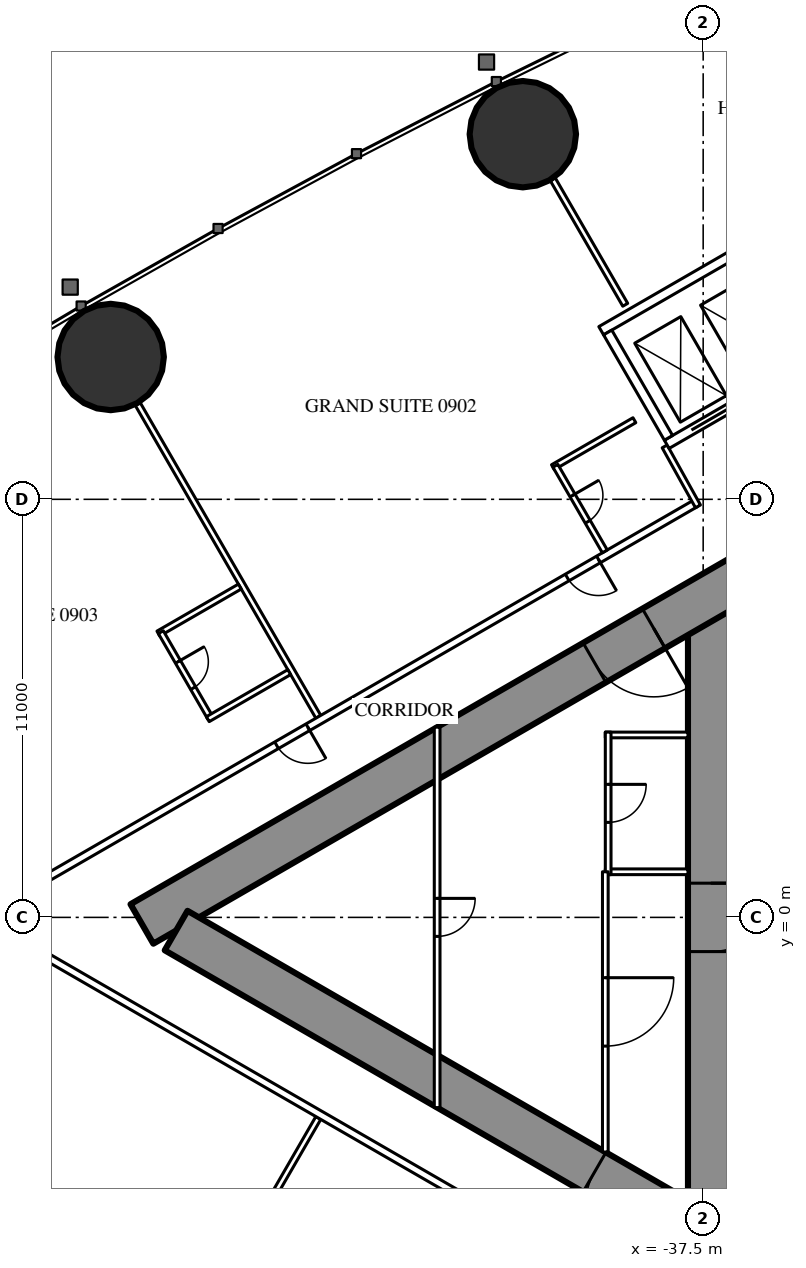
"""IFC4 building model, lengths in metres.
Left out: names, types, materials, properties, quantities, classifications, styles, units other than length and angle.
Written with IfcOpenShell. Run it as: python <this file> out.ifc"""

import sys

from ifc_helpers import new_model, si_unit, direction, frame, frame_2d, origin, origin_2d, place, context, subcontext, project, spatial, rectangle, hollow_circle, extrude, element, fill, save


model = new_model("IFC4")
c1 = context("Model", 3, precision=1e-05, world=origin(), true_north=direction((0.0, 1.0)))
c2 = subcontext(c1, "Body", "Model", "MODEL_VIEW")
j1 = project(units=[si_unit("LENGTHUNIT", "METRE"), si_unit("PLANEANGLEUNIT", "RADIAN")], contexts=[c1])
p1 = place(None, origin())
s1 = spatial("IfcSite", under=j1, at=p1, CompositionType="ELEMENT")
p2 = place(p1, origin())
s2 = spatial("IfcBuilding", under=s1, at=p2, CompositionType="ELEMENT")
p3 = place(p2, frame((0.0, 0.0, 39.0)))
s3 = spatial("IfcBuildingStorey", under=s2, at=p3, CompositionType="ELEMENT", Elevation=39.0)
for number, where, z_axis, x_axis in (
    (1, (-42.245, 20.607, 0.0), (0.0, 0.0, 1.0), (1.0, 0.0, 0.0)),
    (2, (-53.09, 14.745, 0.0), (0.0, 0.0, 1.0), (1.0, 0.0, 0.0)),
):
    element("IfcColumn", number, at=place(p3, frame(where, z_axis=z_axis, x_axis=x_axis)), inside=s3, PredefinedType="COLUMN", context=c2, shape_type="SweptSolid", body=[
        extrude(hollow_circle(Radius=1.4, WallThickness=0.12, at=origin_2d()), origin(), (0.0, 0.0, 1.0), 3.5),
    ])
p4 = place(p3, frame((-37.3, 8.6, 0.0), z_axis=(0.0, 0.0, 1.0), x_axis=(0.0, -1.0, 0.0)))
e3 = element("IfcWall", 3, at=p4, inside=s3, PredefinedType="SHEAR", context=c2, shape_type="SweptSolid", body=[
    extrude(rectangle(XDim=17.2, YDim=1.2, at=frame_2d((8.6, 0.0))), origin(), (0.0, 0.0, 1.0), 3.5),
])
p5 = place(p4, frame((7.7, 0.0, 0.0)))
e4 = element("IfcOpeningElement", 4, at=p5, cuts=e3, PredefinedType="OPENING", context=c2, shape_type="SweptSolid", body=[
    extrude(rectangle(XDim=1.8, YDim=2.2, at=frame_2d((0.9, 1.1))), frame((0.0, 0.61, 0.0), z_axis=(0.0, -1.0, 0.0), x_axis=(1.0, 0.0, 0.0)), (0.0, 0.0, 1.0), 1.22),
])
p6 = place(p3, frame((-27.2, 14.3, 0.0), z_axis=(0.0, 0.0, 1.0), x_axis=(-0.866026593062, -0.499997940104, 0.0)))
e5 = element("IfcWall", 5, at=p6, inside=s3, PredefinedType="SHEAR", context=c2, shape_type="SweptSolid", body=[
    extrude(rectangle(XDim=28.946, YDim=1.2, at=frame_2d((14.473, 0.0))), origin(), (0.0, 0.0, 1.0), 3.5),
])
p7 = place(p6, frame((4.6, 0.0, 0.0)))
e6 = element("IfcOpeningElement", 6, at=p7, cuts=e5, PredefinedType="OPENING", context=c2, shape_type="SweptSolid", body=[
    extrude(rectangle(XDim=1.0, YDim=2.2, at=frame_2d((0.5, 1.1))), frame((0.0, 0.61, 0.0), z_axis=(0.0, -1.0, 0.0), x_axis=(1.0, 0.0, 0.0)), (0.0, 0.0, 1.0), 1.22),
])
p8 = place(p6, frame((13.395, 0.0, 0.0)))
e7 = element("IfcOpeningElement", 7, at=p8, cuts=e5, PredefinedType="OPENING", context=c2, shape_type="SweptSolid", body=[
    extrude(rectangle(XDim=1.8, YDim=2.2, at=frame_2d((0.9, 1.1))), frame((0.0, 0.61, 0.0), z_axis=(0.0, -1.0, 0.0), x_axis=(1.0, 0.0, 0.0)), (0.0, 0.0, 1.0), 1.22),
])
p9 = place(p3, frame((-27.2, -14.3, 0.0), z_axis=(0.0, 0.0, 1.0), x_axis=(-0.866024021859, 0.500002393557, 0.0)))
e8 = element("IfcWall", 8, at=p9, inside=s3, PredefinedType="SHEAR", context=c2, shape_type="SweptSolid", body=[
    extrude(rectangle(XDim=27.907, YDim=1.2, at=frame_2d((13.954, 0.0))), origin(), (0.0, 0.0, 1.0), 3.5),
])
p10 = place(p9, frame((4.6, 0.0, 0.0)))
e9 = element("IfcOpeningElement", 9, at=p10, cuts=e8, PredefinedType="OPENING", context=c2, shape_type="SweptSolid", body=[
    extrude(rectangle(XDim=1.0, YDim=2.2, at=frame_2d((0.5, 1.1))), frame((0.0, 0.61, 0.0), z_axis=(0.0, -1.0, 0.0), x_axis=(1.0, 0.0, 0.0)), (0.0, 0.0, 1.0), 1.22),
])
p11 = place(p9, frame((13.395, 0.0, 0.0)))
e10 = element("IfcOpeningElement", 10, at=p11, cuts=e8, PredefinedType="OPENING", context=c2, shape_type="SweptSolid", body=[
    extrude(rectangle(XDim=1.8, YDim=2.2, at=frame_2d((0.9, 1.1))), frame((0.0, 0.61, 0.0), z_axis=(0.0, -1.0, 0.0), x_axis=(1.0, 0.0, 0.0)), (0.0, 0.0, 1.0), 1.22),
])
for number, where, z_axis, x_axis in (
    (11, (-47.627, 5.278, 0.0), (0.0, 0.0, 1.0), (-0.5, 0.866, 0.0)),
    (12, (-47.627, -5.278, 0.0), (0.0, 0.0, 1.0), (-0.5, -0.866, 0.0)),
):
    element("IfcWall", number, at=place(p3, frame(where, z_axis=z_axis, x_axis=x_axis)), inside=s3, PredefinedType="PARTITIONING", context=c2, shape_type="SweptSolid", body=[
        extrude(rectangle(XDim=9.51, YDim=0.15, at=frame_2d((4.755, 0.0))), origin(), (0.0, 0.0, 1.0), 2.25),
    ])
p12 = place(p3, frame((-39.551, 16.119, 0.0), z_axis=(0.0, 0.0, 1.0), x_axis=(-0.500014214979, 0.866017196607, 0.0)))
e13 = element("IfcWall", 13, at=p12, inside=s3, PredefinedType="PARTITIONING", context=c2, shape_type="SweptSolid", body=[
    extrude(rectangle(XDim=3.815, YDim=0.15, at=frame_2d((1.907, 0.0))), origin(), (0.0, 0.0, 1.0), 3.25),
])
p13 = place(p3, frame((-37.7, 10.894, 0.0), z_axis=(0.0, 0.0, 1.0), x_axis=(-0.866027905338, -0.499995667157, 0.0)))
e14 = element("IfcWall", 14, at=p13, inside=s3, PredefinedType="PARTITIONING", context=c2, shape_type="SweptSolid", body=[
    extrude(rectangle(XDim=21.787, YDim=0.2, at=frame_2d((10.894, 0.0))), origin(), (0.0, 0.0, 1.0), 3.25),
])
p14 = place(p13, frame((11.78, 0.0, 0.0)))
e15 = element("IfcOpeningElement", 15, at=p14, cuts=e14, PredefinedType="OPENING", context=c2, shape_type="SweptSolid", body=[
    extrude(rectangle(XDim=0.95, YDim=2.2, at=frame_2d((0.475, 1.1))), frame((0.0, 0.11, 0.0), z_axis=(0.0, -1.0, 0.0), x_axis=(1.0, 0.0, 0.0)), (0.0, 0.0, 1.0), 0.22),
])
p15 = place(p13, frame((2.95, 0.0, 0.0)))
e16 = element("IfcOpeningElement", 16, at=p15, cuts=e14, PredefinedType="OPENING", context=c2, shape_type="SweptSolid", body=[
    extrude(rectangle(XDim=0.95, YDim=2.2, at=frame_2d((0.475, 1.1))), frame((0.0, 0.11, 0.0), z_axis=(0.0, -1.0, 0.0), x_axis=(1.0, 0.0, 0.0)), (0.0, 0.0, 1.0), 0.22),
])
p16 = place(p3, frame((-36.92, -11.344, 0.0), z_axis=(0.0, 0.0, 1.0), x_axis=(-0.866028313256, 0.499994960614, 0.0)))
e17 = element("IfcWall", 17, at=p16, inside=s3, PredefinedType="PARTITIONING", context=c2, shape_type="SweptSolid", body=[
    extrude(rectangle(XDim=22.568, YDim=0.2, at=frame_2d((11.284, 0.0))), origin(), (0.0, 0.0, 1.0), 3.25),
])
p17 = place(p16, frame((21.018, 0.0, 0.0)))
e18 = element("IfcOpeningElement", 18, at=p17, cuts=e17, PredefinedType="OPENING", context=c2, shape_type="SweptSolid", body=[
    extrude(rectangle(XDim=0.95, YDim=2.2, at=frame_2d((0.475, 1.1))), frame((0.0, 0.11, 0.0), z_axis=(0.0, -1.0, 0.0), x_axis=(1.0, 0.0, 0.0)), (0.0, 0.0, 1.0), 0.22),
])
p18 = place(p16, frame((3.35, 0.0, 0.0)))
e19 = element("IfcOpeningElement", 19, at=p18, cuts=e17, PredefinedType="OPENING", context=c2, shape_type="SweptSolid", body=[
    extrude(rectangle(XDim=1.0, YDim=2.2, at=frame_2d((0.5, 1.1))), frame((0.0, 0.11, 0.0), z_axis=(0.0, -1.0, 0.0), x_axis=(1.0, 0.0, 0.0)), (0.0, 0.0, 1.0), 0.22),
])
p19 = place(p3, frame((-38.513, 12.392, 0.0), z_axis=(0.0, 0.0, 1.0), x_axis=(0.485585508183, -0.874189175317, 0.0)))
e20 = element("IfcWall", 20, at=p19, inside=s3, PredefinedType="PARTITIONING", context=c2, shape_type="SweptSolid", body=[
    extrude(rectangle(XDim=1.805, YDim=0.15, at=frame_2d((0.902, 0.0))), origin(), (0.0, 0.0, 1.0), 3.25),
])
p20 = place(p3, frame((-49.692, 8.704, 0.0), z_axis=(0.0, 0.0, 1.0), x_axis=(-0.866073894602, -0.499916002032, 0.0)))
e21 = element("IfcWall", 21, at=p20, inside=s3, PredefinedType="PARTITIONING", context=c2, shape_type="SweptSolid", body=[
    extrude(rectangle(XDim=2.475, YDim=0.15, at=frame_2d((1.238, 0.0))), origin(), (0.0, 0.0, 1.0), 3.25),
])
p21 = place(p3, frame((-50.47, 5.253, 0.0), z_axis=(0.0, 0.0, 1.0), x_axis=(-0.500006934395, 0.866021400173, 0.0)))
e22 = element("IfcWall", 22, at=p21, inside=s3, PredefinedType="PARTITIONING", context=c2, shape_type="SweptSolid", body=[
    extrude(rectangle(XDim=2.6, YDim=0.15, at=frame_2d((1.3, 0.0))), origin(), (0.0, 0.0, 1.0), 3.25),
])
p22 = place(p21, frame((0.9, 0.0, 0.0)))
e23 = element("IfcOpeningElement", 23, at=p22, cuts=e22, PredefinedType="OPENING", context=c2, shape_type="SweptSolid", body=[
    extrude(rectangle(XDim=0.8, YDim=2.2, at=frame_2d((0.4, 1.1))), frame((0.0, 0.085, 0.0), z_axis=(0.0, -1.0, 0.0), x_axis=(1.0, 0.0, 0.0)), (0.0, 0.0, 1.0), 0.17),
])
p23 = place(p3, frame((-48.392, 6.453, 0.0), z_axis=(0.0, 0.0, 1.0), x_axis=(-0.86604923931, -0.499958713387, 0.0)))
e24 = element("IfcWall", 24, at=p23, inside=s3, PredefinedType="PARTITIONING", context=c2, shape_type="SweptSolid", body=[
    extrude(rectangle(XDim=2.475, YDim=0.15, at=frame_2d((1.237, 0.0))), origin(), (0.0, 0.0, 1.0), 3.25),
])
p24 = place(p3, frame((-39.31, 13.082, 0.0), z_axis=(0.0, 0.0, 1.0), x_axis=(-0.866031185235, -0.4999899861, 0.0)))
e25 = element("IfcWall", 25, at=p24, inside=s3, PredefinedType="PARTITIONING", context=c2, shape_type="SweptSolid", body=[
    extrude(rectangle(XDim=2.475, YDim=0.15, at=frame_2d((1.238, 0.0))), origin(), (0.0, 0.0, 1.0), 3.25),
])
p25 = place(p3, frame((-40.088, 9.63, 0.0), z_axis=(0.0, 0.0, 1.0), x_axis=(-0.500006934395, 0.866021400173, 0.0)))
e26 = element("IfcWall", 26, at=p25, inside=s3, PredefinedType="PARTITIONING", context=c2, shape_type="SweptSolid", body=[
    extrude(rectangle(XDim=2.6, YDim=0.15, at=frame_2d((1.3, 0.0))), origin(), (0.0, 0.0, 1.0), 3.25),
])
p26 = place(p25, frame((0.9, 0.0, 0.0)))
e27 = element("IfcOpeningElement", 27, at=p26, cuts=e26, PredefinedType="OPENING", context=c2, shape_type="SweptSolid", body=[
    extrude(rectangle(XDim=0.8, YDim=2.2, at=frame_2d((0.4, 1.1))), frame((0.0, 0.085, 0.0), z_axis=(0.0, -1.0, 0.0), x_axis=(1.0, 0.0, 0.0)), (0.0, 0.0, 1.0), 0.17),
])
for number, where, z_axis, x_axis in (
    (28, (-37.9, 1.2, 0.0), (0.0, 0.0, 1.0), (-1.0, 0.0, 0.0)),
    (29, (-37.9, 4.8, 0.0), (0.0, 0.0, 1.0), (-1.0, 0.0, 0.0)),
):
    element("IfcWall", number, at=place(p3, frame(where, z_axis=z_axis, x_axis=x_axis)), inside=s3, PredefinedType="PARTITIONING", context=c2, shape_type="SweptSolid", body=[
        extrude(rectangle(XDim=2.175, YDim=0.15, at=frame_2d((1.087, 0.0))), origin(), (0.0, 0.0, 1.0), 3.25),
    ])
p27 = place(p3, frame((-40.0, 4.875, 0.0), z_axis=(0.0, 0.0, 1.0), x_axis=(0.0, -1.0, 0.0)))
e30 = element("IfcWall", 30, at=p27, inside=s3, PredefinedType="PARTITIONING", context=c2, shape_type="SweptSolid", body=[
    extrude(rectangle(XDim=3.75, YDim=0.15, at=frame_2d((1.875, 0.0))), origin(), (0.0, 0.0, 1.0), 3.25),
])
p28 = place(p27, frame((1.375, 0.0, 0.0)))
e31 = element("IfcOpeningElement", 31, at=p28, cuts=e30, PredefinedType="OPENING", context=c2, shape_type="SweptSolid", body=[
    extrude(rectangle(XDim=1.0, YDim=2.2, at=frame_2d((0.5, 1.1))), frame((0.0, 0.085, 0.0), z_axis=(0.0, -1.0, 0.0), x_axis=(1.0, 0.0, 0.0)), (0.0, 0.0, 1.0), 0.17),
])
p29 = place(p3, frame((-40.075, 1.2, 0.0), z_axis=(0.0, 0.0, 1.0), x_axis=(0.0, -1.0, 0.0)))
e32 = element("IfcWall", 32, at=p29, inside=s3, PredefinedType="PARTITIONING", context=c2, shape_type="SweptSolid", body=[
    extrude(rectangle(XDim=7.374, YDim=0.15, at=frame_2d((3.687, 0.0))), origin(), (0.0, 0.0, 1.0), 3.25),
])
p30 = place(p29, frame((2.787, 0.0, 0.0)))
e33 = element("IfcOpeningElement", 33, at=p30, cuts=e32, PredefinedType="OPENING", context=c2, shape_type="SweptSolid", body=[
    extrude(rectangle(XDim=1.8, YDim=2.2, at=frame_2d((0.9, 1.1))), frame((0.0, 0.085, 0.0), z_axis=(0.0, -1.0, 0.0), x_axis=(1.0, 0.0, 0.0)), (0.0, 0.0, 1.0), 0.17),
])
p31 = place(p3, frame((-44.5, 5.005, 0.0), z_axis=(0.0, 0.0, 1.0), x_axis=(0.0, -1.0, 0.0)))
e34 = element("IfcWall", 34, at=p31, inside=s3, PredefinedType="PARTITIONING", context=c2, shape_type="SweptSolid", body=[
    extrude(rectangle(XDim=10.009, YDim=0.15, at=frame_2d((5.005, 0.0))), origin(), (0.0, 0.0, 1.0), 2.45),
])
p32 = place(p31, frame((4.505, 0.0, 0.0)))
e35 = element("IfcOpeningElement", 35, at=p32, cuts=e34, PredefinedType="OPENING", context=c2, shape_type="SweptSolid", body=[
    extrude(rectangle(XDim=1.0, YDim=2.2, at=frame_2d((0.5, 1.1))), frame((0.0, 0.085, 0.0), z_axis=(0.0, -1.0, 0.0), x_axis=(1.0, 0.0, 0.0)), (0.0, 0.0, 1.0), 0.17),
])
p33 = place(p3, frame((-31.01, 16.747, 0.0), z_axis=(0.0, 0.0, 1.0), x_axis=(-0.866028165386, -0.499995216735, 0.0)))
e36 = element("IfcWall", 36, at=p33, inside=s3, PredefinedType="PARTITIONING", context=c2, shape_type="SweptSolid", body=[
    extrude(rectangle(XDim=8.6, YDim=0.25, at=frame_2d((4.3, 0.0))), origin(), (0.0, 0.0, 1.0), 3.25),
])
p34 = place(p33, frame((0.75, 0.0, 0.0)))
e37 = element("IfcOpeningElement", 37, at=p34, cuts=e36, PredefinedType="OPENING", context=c2, shape_type="SweptSolid", body=[
    extrude(rectangle(XDim=1.1, YDim=2.2, at=frame_2d((0.55, 1.1))), frame((0.0, 0.135, 0.0), z_axis=(0.0, -1.0, 0.0), x_axis=(1.0, 0.0, 0.0)), (0.0, 0.0, 1.0), 0.27),
])
p35 = place(p33, frame((2.75, 0.0, 0.0)))
e38 = element("IfcOpeningElement", 38, at=p35, cuts=e36, PredefinedType="OPENING", context=c2, shape_type="SweptSolid", body=[
    extrude(rectangle(XDim=1.1, YDim=2.2, at=frame_2d((0.55, 1.1))), frame((0.0, 0.135, 0.0), z_axis=(0.0, -1.0, 0.0), x_axis=(1.0, 0.0, 0.0)), (0.0, 0.0, 1.0), 0.27),
])
p36 = place(p33, frame((4.75, 0.0, 0.0)))
e39 = element("IfcOpeningElement", 39, at=p36, cuts=e36, PredefinedType="OPENING", context=c2, shape_type="SweptSolid", body=[
    extrude(rectangle(XDim=1.1, YDim=2.2, at=frame_2d((0.55, 1.1))), frame((0.0, 0.135, 0.0), z_axis=(0.0, -1.0, 0.0), x_axis=(1.0, 0.0, 0.0)), (0.0, 0.0, 1.0), 0.27),
])
p37 = place(p33, frame((6.75, 0.0, 0.0)))
e40 = element("IfcOpeningElement", 40, at=p37, cuts=e36, PredefinedType="OPENING", context=c2, shape_type="SweptSolid", body=[
    extrude(rectangle(XDim=1.1, YDim=2.2, at=frame_2d((0.55, 1.1))), frame((0.0, 0.135, 0.0), z_axis=(0.0, -1.0, 0.0), x_axis=(1.0, 0.0, 0.0)), (0.0, 0.0, 1.0), 0.27),
])
p38 = place(p3, frame((-32.736, 19.736, 0.0), z_axis=(0.0, 0.0, 1.0), x_axis=(-0.866028165386, -0.499995216735, 0.0)))
e41 = element("IfcWall", 41, at=p38, inside=s3, PredefinedType="PARTITIONING", context=c2, shape_type="SweptSolid", body=[
    extrude(rectangle(XDim=8.6, YDim=0.25, at=frame_2d((4.3, 0.0))), origin(), (0.0, 0.0, 1.0), 3.25),
])
p39 = place(p3, frame((-38.413, 12.618, 0.0), z_axis=(0.0, 0.0, 1.0), x_axis=(-0.499872130319, 0.866099216793, 0.0)))
e42 = element("IfcWall", 42, at=p39, inside=s3, PredefinedType="PARTITIONING", context=c2, shape_type="SweptSolid", body=[
    extrude(rectangle(XDim=3.2, YDim=0.25, at=frame_2d((1.6, 0.0))), origin(), (0.0, 0.0, 1.0), 3.25),
])
p40 = place(p22, origin())
e43 = element("IfcDoor", 43, at=p40, inside=s3, OperationType="SINGLE_SWING_RIGHT", PredefinedType="DOOR", context=c2, shape_type="SweptSolid", body=[
    extrude(rectangle(XDim=0.8, YDim=2.2, at=frame_2d((0.4, 1.1))), frame((0.0, 0.025, 0.0), z_axis=(0.0, -1.0, 0.0), x_axis=(1.0, 0.0, 0.0)), (0.0, 0.0, 1.0), 0.05),
])
fill(e23, e43)
p41 = place(p14, origin())
e44 = element("IfcDoor", 44, at=p41, inside=s3, OperationType="SINGLE_SWING_LEFT", PredefinedType="DOOR", context=c2, shape_type="SweptSolid", body=[
    extrude(rectangle(XDim=0.95, YDim=2.2, at=frame_2d((0.475, 1.1))), frame((0.0, 0.025, 0.0), z_axis=(0.0, -1.0, 0.0), x_axis=(1.0, 0.0, 0.0)), (0.0, 0.0, 1.0), 0.05),
])
fill(e15, e44)
p42 = place(p26, origin())
e45 = element("IfcDoor", 45, at=p42, inside=s3, OperationType="SINGLE_SWING_RIGHT", PredefinedType="DOOR", context=c2, shape_type="SweptSolid", body=[
    extrude(rectangle(XDim=0.8, YDim=2.2, at=frame_2d((0.4, 1.1))), frame((0.0, 0.025, 0.0), z_axis=(0.0, -1.0, 0.0), x_axis=(1.0, 0.0, 0.0)), (0.0, 0.0, 1.0), 0.05),
])
fill(e27, e45)
p43 = place(p15, origin())
e46 = element("IfcDoor", 46, at=p43, inside=s3, OperationType="SINGLE_SWING_LEFT", PredefinedType="DOOR", context=c2, shape_type="SweptSolid", body=[
    extrude(rectangle(XDim=0.95, YDim=2.2, at=frame_2d((0.475, 1.1))), frame((0.0, 0.025, 0.0), z_axis=(0.0, -1.0, 0.0), x_axis=(1.0, 0.0, 0.0)), (0.0, 0.0, 1.0), 0.05),
])
fill(e16, e46)
p44 = place(p28, origin())
e47 = element("IfcDoor", 47, at=p44, inside=s3, OperationType="SINGLE_SWING_LEFT", PredefinedType="DOOR", context=c2, shape_type="SweptSolid", body=[
    extrude(rectangle(XDim=1.0, YDim=2.2, at=frame_2d((0.5, 1.1))), frame((0.0, 0.025, 0.0), z_axis=(0.0, -1.0, 0.0), x_axis=(1.0, 0.0, 0.0)), (0.0, 0.0, 1.0), 0.05),
])
fill(e31, e47)
p45 = place(p30, origin())
e48 = element("IfcDoor", 48, at=p45, inside=s3, OperationType="DOUBLE_DOOR_SINGLE_SWING", PredefinedType="DOOR", context=c2, shape_type="SweptSolid", body=[
    extrude(rectangle(XDim=1.8, YDim=2.2, at=frame_2d((0.9, 1.1))), frame((0.0, 0.025, 0.0), z_axis=(0.0, -1.0, 0.0), x_axis=(1.0, 0.0, 0.0)), (0.0, 0.0, 1.0), 0.05),
])
fill(e33, e48)
p46 = place(p32, origin())
e49 = element("IfcDoor", 49, at=p46, inside=s3, OperationType="SINGLE_SWING_LEFT", PredefinedType="DOOR", context=c2, shape_type="SweptSolid", body=[
    extrude(rectangle(XDim=1.0, YDim=2.2, at=frame_2d((0.5, 1.1))), frame((0.0, 0.025, 0.0), z_axis=(0.0, -1.0, 0.0), x_axis=(1.0, 0.0, 0.0)), (0.0, 0.0, 1.0), 0.05),
])
fill(e35, e49)
p47 = place(p8, origin())
e50 = element("IfcDoor", 50, at=p47, inside=s3, OperationType="DOUBLE_DOOR_SINGLE_SWING", PredefinedType="DOOR", context=c2, shape_type="SweptSolid", body=[
    extrude(rectangle(XDim=1.8, YDim=2.2, at=frame_2d((0.9, 1.1))), frame((0.0, 0.025, 0.0), z_axis=(0.0, -1.0, 0.0), x_axis=(1.0, 0.0, 0.0)), (0.0, 0.0, 1.0), 0.05),
])
fill(e7, e50)
p48 = place(p11, origin())
e51 = element("IfcDoor", 51, at=p48, inside=s3, OperationType="DOUBLE_DOOR_SINGLE_SWING", PredefinedType="DOOR", context=c2, shape_type="SweptSolid", body=[
    extrude(rectangle(XDim=1.8, YDim=2.2, at=frame_2d((0.9, 1.1))), frame((0.0, 0.025, 0.0), z_axis=(0.0, -1.0, 0.0), x_axis=(1.0, 0.0, 0.0)), (0.0, 0.0, 1.0), 0.05),
])
fill(e10, e51)
p49 = place(p5, origin())
e52 = element("IfcDoor", 52, at=p49, inside=s3, OperationType="DOUBLE_DOOR_SINGLE_SWING", PredefinedType="DOOR", context=c2, shape_type="SweptSolid", body=[
    extrude(rectangle(XDim=1.8, YDim=2.2, at=frame_2d((0.9, 1.1))), frame((0.0, 0.025, 0.0), z_axis=(0.0, -1.0, 0.0), x_axis=(1.0, 0.0, 0.0)), (0.0, 0.0, 1.0), 0.05),
])
fill(e4, e52)
p50 = place(p37, origin())
e53 = element("IfcDoor", 53, at=p50, inside=s3, OperationType="DOUBLE_DOOR_SLIDING", PredefinedType="USERDEFINED", context=c2, shape_type="SweptSolid", body=[
    extrude(rectangle(XDim=1.1, YDim=2.2, at=frame_2d((0.55, 1.1))), frame((0.0, 0.025, 0.0), z_axis=(0.0, -1.0, 0.0), x_axis=(1.0, 0.0, 0.0)), (0.0, 0.0, 1.0), 0.05),
])
fill(e40, e53)
save(model, sys.argv[1])
